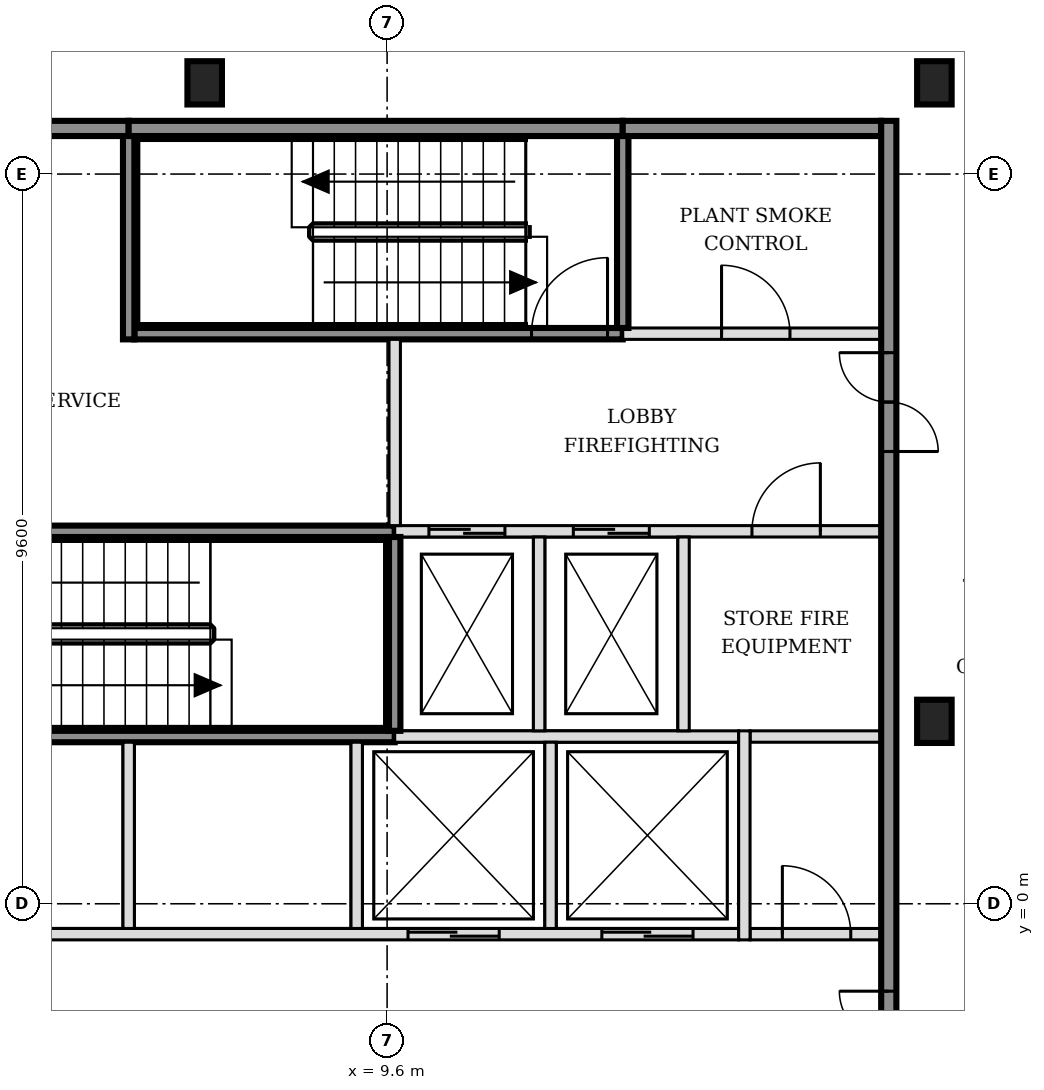
"""IFC4 building model, lengths in metres.
Left out: names, types, materials, properties, quantities, classifications, styles, units other than length and angle.
Written with IfcOpenShell. Run it as: python <this file> out.ifc"""

import sys

from ifc_helpers import new_model, si_unit, direction, frame, frame_2d, origin, origin_2d, place, context, subcontext, project, spatial, rectangle, i_section, extrude, element, fill, save


model = new_model("IFC4")
c1 = context("Model", 3, precision=1e-05, world=origin(), true_north=direction((0.0, 1.0)))
c2 = subcontext(c1, "Body", "Model", "MODEL_VIEW")
j1 = project(units=[si_unit("LENGTHUNIT", "METRE"), si_unit("PLANEANGLEUNIT", "RADIAN")], contexts=[c1])
p1 = place(None, origin())
s1 = spatial("IfcSite", under=j1, at=p1, CompositionType="ELEMENT")
p2 = place(p1, origin())
s2 = spatial("IfcBuilding", under=s1, at=p2, CompositionType="ELEMENT")
p3 = place(p2, frame((0.0, 0.0, 51.0)))
s3 = spatial("IfcBuildingStorey", under=s2, at=p3, CompositionType="ELEMENT", Elevation=51.0)
for number, where, z_axis, x_axis in (
    (1, (16.8, 2.4, -0.15), (0.0, 0.0, 1.0), (1.0, 0.0, 0.0)),
    (2, (7.2, 10.8, -0.15), (0.0, 0.0, 1.0), (1.0, 0.0, 0.0)),
    (3, (16.8, 10.8, -0.15), (0.0, 0.0, 1.0), (1.0, 0.0, 0.0)),
):
    element("IfcColumn", number, at=place(p3, frame(where, z_axis=z_axis, x_axis=x_axis)), inside=s3, PredefinedType="COLUMN", context=c2, shape_type="SweptSolid", body=[
        extrude(i_section(OverallWidth=0.454, OverallDepth=0.569, WebThickness=0.078, FlangeThickness=0.125, FilletRadius=0.015, at=origin_2d()), origin(), (0.0, 0.0, 1.0), 3.6),
    ])
p4 = place(p3, frame((-1.7, -0.4, 0.0), z_axis=(0.0, 0.0, 1.0), x_axis=(1.0, 0.0, 0.0)))
e4 = element("IfcWall", 4, at=p4, inside=s3, PredefinedType="SOLIDWALL", context=c2, shape_type="SweptSolid", body=[
    extrude(rectangle(XDim=15.925, YDim=0.15, at=frame_2d((7.962, 0.0))), origin(), (0.0, 0.0, 1.0), 3.45),
])
p5 = place(p4, frame((0.6, 0.0, 0.0)))
e5 = element("IfcOpeningElement", 5, at=p5, cuts=e4, PredefinedType="OPENING", context=c2, shape_type="SweptSolid", body=[
    extrude(rectangle(XDim=1.1, YDim=2.1, at=frame_2d((0.55, 1.05))), frame((0.0, 0.085, 0.0), z_axis=(0.0, -1.0, 0.0), x_axis=(1.0, 0.0, 0.0)), (0.0, 0.0, 1.0), 0.17),
])
p6 = place(p4, frame((3.1, 0.0, 0.0)))
e6 = element("IfcOpeningElement", 6, at=p6, cuts=e4, PredefinedType="OPENING", context=c2, shape_type="SweptSolid", body=[
    extrude(rectangle(XDim=1.1, YDim=2.1, at=frame_2d((0.55, 1.05))), frame((0.0, 0.085, 0.0), z_axis=(0.0, -1.0, 0.0), x_axis=(1.0, 0.0, 0.0)), (0.0, 0.0, 1.0), 0.17),
])
p7 = place(p4, frame((11.575, 0.0, 0.0)))
e7 = element("IfcOpeningElement", 7, at=p7, cuts=e4, PredefinedType="OPENING", context=c2, shape_type="SweptSolid", body=[
    extrude(rectangle(XDim=1.2, YDim=2.1, at=frame_2d((0.6, 1.05))), frame((0.0, 0.085, 0.0), z_axis=(0.0, -1.0, 0.0), x_axis=(1.0, 0.0, 0.0)), (0.0, 0.0, 1.0), 0.17),
])
p8 = place(p4, frame((14.125, 0.0, 0.0)))
e8 = element("IfcOpeningElement", 8, at=p8, cuts=e4, PredefinedType="OPENING", context=c2, shape_type="SweptSolid", body=[
    extrude(rectangle(XDim=1.2, YDim=2.1, at=frame_2d((0.6, 1.05))), frame((0.0, 0.085, 0.0), z_axis=(0.0, -1.0, 0.0), x_axis=(1.0, 0.0, 0.0)), (0.0, 0.0, 1.0), 0.17),
])
p9 = place(p3, frame((14.375, -0.4, 0.0), z_axis=(0.0, 0.0, 1.0), x_axis=(1.0, 0.0, 0.0)))
e9 = element("IfcWall", 9, at=p9, inside=s3, PredefinedType="PARTITIONING", context=c2, shape_type="SweptSolid", body=[
    extrude(rectangle(XDim=1.725, YDim=0.15, at=frame_2d((0.863, 0.0))), origin(), (0.0, 0.0, 1.0), 3.45),
])
p10 = place(p9, frame((0.425, 0.0, 0.0)))
e10 = element("IfcOpeningElement", 10, at=p10, cuts=e9, PredefinedType="OPENING", context=c2, shape_type="SweptSolid", body=[
    extrude(rectangle(XDim=0.9, YDim=2.1, at=frame_2d((0.45, 1.05))), frame((0.0, 0.085, 0.0), z_axis=(0.0, -1.0, 0.0), x_axis=(1.0, 0.0, 0.0)), (0.0, 0.0, 1.0), 0.17),
])
p11 = place(p3, frame((3.2, 2.2, 0.0), z_axis=(0.0, 0.0, 1.0), x_axis=(1.0, 0.0, 0.0)))
e11 = element("IfcWall", 11, at=p11, inside=s3, PredefinedType="SOLIDWALL", context=c2, shape_type="SweptSolid", body=[
    extrude(rectangle(XDim=6.5, YDim=0.15, at=frame_2d((3.25, 0.0))), origin(), (0.0, 0.0, 1.0), 3.45),
])
p12 = place(p3, frame((9.7, 2.2, 0.0), z_axis=(0.0, 0.0, 1.0), x_axis=(1.0, 0.0, 0.0)))
e12 = element("IfcWall", 12, at=p12, inside=s3, PredefinedType="SOLIDWALL", context=c2, shape_type="SweptSolid", body=[
    extrude(rectangle(XDim=4.525, YDim=0.15, at=frame_2d((2.263, 0.0))), origin(), (0.0, 0.0, 1.0), 3.45),
])
p13 = place(p3, frame((14.375, 2.2, 0.0), z_axis=(0.0, 0.0, 1.0), x_axis=(1.0, 0.0, 0.0)))
e13 = element("IfcWall", 13, at=p13, inside=s3, PredefinedType="PARTITIONING", context=c2, shape_type="SweptSolid", body=[
    extrude(rectangle(XDim=1.725, YDim=0.15, at=frame_2d((0.863, 0.0))), origin(), (0.0, 0.0, 1.0), 3.45),
])
p14 = place(p3, frame((3.275, 4.9, 0.0), z_axis=(0.0, 0.0, 1.0), x_axis=(1.0, 0.0, 0.0)))
e14 = element("IfcWall", 14, at=p14, inside=s3, PredefinedType="SOLIDWALL", context=c2, shape_type="SweptSolid", body=[
    extrude(rectangle(XDim=6.425, YDim=0.15, at=frame_2d((3.212, 0.0))), origin(), (0.0, 0.0, 1.0), 3.45),
])
p15 = place(p14, frame((0.1, 0.0, 0.0)))
e15 = element("IfcOpeningElement", 15, at=p15, cuts=e14, PredefinedType="OPENING", context=c2, shape_type="SweptSolid", body=[
    extrude(rectangle(XDim=1.0, YDim=2.1, at=frame_2d((0.5, 1.05))), frame((0.0, 0.085, 0.0), z_axis=(0.0, -1.0, 0.0), x_axis=(1.0, 0.0, 0.0)), (0.0, 0.0, 1.0), 0.17),
])
p16 = place(p3, frame((9.7, 4.9, 0.0), z_axis=(0.0, 0.0, 1.0), x_axis=(1.0, 0.0, 0.0)))
e16 = element("IfcWall", 16, at=p16, inside=s3, PredefinedType="SOLIDWALL", context=c2, shape_type="SweptSolid", body=[
    extrude(rectangle(XDim=6.4, YDim=0.15, at=frame_2d((3.2, 0.0))), origin(), (0.0, 0.0, 1.0), 3.45),
])
p17 = place(p16, frame((0.45, 0.0, 0.0)))
e17 = element("IfcOpeningElement", 17, at=p17, cuts=e16, PredefinedType="OPENING", context=c2, shape_type="SweptSolid", body=[
    extrude(rectangle(XDim=1.0, YDim=2.1, at=frame_2d((0.5, 1.05))), frame((0.0, 0.085, 0.0), z_axis=(0.0, -1.0, 0.0), x_axis=(1.0, 0.0, 0.0)), (0.0, 0.0, 1.0), 0.17),
])
p18 = place(p16, frame((2.35, 0.0, 0.0)))
e18 = element("IfcOpeningElement", 18, at=p18, cuts=e16, PredefinedType="OPENING", context=c2, shape_type="SweptSolid", body=[
    extrude(rectangle(XDim=1.0, YDim=2.1, at=frame_2d((0.5, 1.05))), frame((0.0, 0.085, 0.0), z_axis=(0.0, -1.0, 0.0), x_axis=(1.0, 0.0, 0.0)), (0.0, 0.0, 1.0), 0.17),
])
p19 = place(p16, frame((4.7, 0.0, 0.0)))
e19 = element("IfcOpeningElement", 19, at=p19, cuts=e16, PredefinedType="OPENING", context=c2, shape_type="SweptSolid", body=[
    extrude(rectangle(XDim=0.9, YDim=2.1, at=frame_2d((0.45, 1.05))), frame((0.0, 0.085, 0.0), z_axis=(0.0, -1.0, 0.0), x_axis=(1.0, 0.0, 0.0)), (0.0, 0.0, 1.0), 0.17),
])
p20 = place(p3, frame((6.275, 7.5, 0.0), z_axis=(0.0, 0.0, 1.0), x_axis=(1.0, 0.0, 0.0)))
e20 = element("IfcWall", 20, at=p20, inside=s3, PredefinedType="SOLIDWALL", context=c2, shape_type="SweptSolid", body=[
    extrude(rectangle(XDim=6.425, YDim=0.15, at=frame_2d((3.212, 0.0))), origin(), (0.0, 0.0, 1.0), 3.45),
])
p21 = place(p20, frame((5.225, 0.0, 0.0)))
e21 = element("IfcOpeningElement", 21, at=p21, cuts=e20, PredefinedType="OPENING", context=c2, shape_type="SweptSolid", body=[
    extrude(rectangle(XDim=1.0, YDim=2.1, at=frame_2d((0.5, 1.05))), frame((0.0, 0.085, 0.0), z_axis=(0.0, -1.0, 0.0), x_axis=(1.0, 0.0, 0.0)), (0.0, 0.0, 1.0), 0.17),
])
p22 = place(p3, frame((12.7, 7.5, 0.0), z_axis=(0.0, 0.0, 1.0), x_axis=(1.0, 0.0, 0.0)))
e22 = element("IfcWall", 22, at=p22, inside=s3, PredefinedType="SOLIDWALL", context=c2, shape_type="SweptSolid", body=[
    extrude(rectangle(XDim=3.4, YDim=0.15, at=frame_2d((1.7, 0.0))), origin(), (0.0, 0.0, 1.0), 3.45),
])
p23 = place(p22, frame((1.3, 0.0, 0.0)))
e23 = element("IfcOpeningElement", 23, at=p23, cuts=e22, PredefinedType="OPENING", context=c2, shape_type="SweptSolid", body=[
    extrude(rectangle(XDim=0.9, YDim=2.1, at=frame_2d((0.45, 1.05))), frame((0.0, 0.085, 0.0), z_axis=(0.0, -1.0, 0.0), x_axis=(1.0, 0.0, 0.0)), (0.0, 0.0, 1.0), 0.17),
])
p24 = place(p3, frame((-1.7, 10.2, 0.0), z_axis=(0.0, 0.0, 1.0), x_axis=(1.0, 0.0, 0.0)))
e24 = element("IfcWall", 24, at=p24, inside=s3, PredefinedType="SOLIDWALL", context=c2, shape_type="SweptSolid", body=[
    extrude(rectangle(XDim=7.9, YDim=0.2, at=frame_2d((3.95, 0.0))), origin(), (0.0, 0.0, 1.0), 3.45),
])
p25 = place(p3, frame((6.2, 10.2, 0.0), z_axis=(0.0, 0.0, 1.0), x_axis=(1.0, 0.0, 0.0)))
e25 = element("IfcWall", 25, at=p25, inside=s3, PredefinedType="SOLIDWALL", context=c2, shape_type="SweptSolid", body=[
    extrude(rectangle(XDim=6.5, YDim=0.2, at=frame_2d((3.25, 0.0))), origin(), (0.0, 0.0, 1.0), 3.45),
])
p26 = place(p3, frame((12.7, 10.2, 0.0), z_axis=(0.0, 0.0, 1.0), x_axis=(1.0, 0.0, 0.0)))
e26 = element("IfcWall", 26, at=p26, inside=s3, PredefinedType="SOLIDWALL", context=c2, shape_type="SweptSolid", body=[
    extrude(rectangle(XDim=3.4, YDim=0.2, at=frame_2d((1.7, 0.0))), origin(), (0.0, 0.0, 1.0), 3.45),
])
p27 = place(p3, frame((6.2, -0.325, 0.0), z_axis=(0.0, 0.0, 1.0), x_axis=(0.0, 1.0, 0.0)))
e27 = element("IfcWall", 27, at=p27, inside=s3, PredefinedType="SOLIDWALL", context=c2, shape_type="SweptSolid", body=[
    extrude(rectangle(XDim=2.45, YDim=0.15, at=frame_2d((1.225, 0.0))), origin(), (0.0, 0.0, 1.0), 3.45),
])
p28 = place(p3, frame((6.2, 7.425, 0.0), z_axis=(0.0, 0.0, 1.0), x_axis=(0.0, 1.0, 0.0)))
e28 = element("IfcWall", 28, at=p28, inside=s3, PredefinedType="SOLIDWALL", context=c2, shape_type="SweptSolid", body=[
    extrude(rectangle(XDim=2.675, YDim=0.15, at=frame_2d((1.337, 0.0))), origin(), (0.0, 0.0, 1.0), 3.45),
])
p29 = place(p3, frame((9.2, -0.325, 0.0), z_axis=(0.0, 0.0, 1.0), x_axis=(0.0, 1.0, 0.0)))
e29 = element("IfcWall", 29, at=p29, inside=s3, PredefinedType="SOLIDWALL", context=c2, shape_type="SweptSolid", body=[
    extrude(rectangle(XDim=2.45, YDim=0.15, at=frame_2d((1.225, 0.0))), origin(), (0.0, 0.0, 1.0), 3.45),
])
p30 = place(p3, frame((9.7, 2.275, 0.0), z_axis=(0.0, 0.0, 1.0), x_axis=(0.0, 1.0, 0.0)))
e30 = element("IfcWall", 30, at=p30, inside=s3, PredefinedType="SOLIDWALL", context=c2, shape_type="SweptSolid", body=[
    extrude(rectangle(XDim=2.55, YDim=0.15, at=frame_2d((1.275, 0.0))), origin(), (0.0, 0.0, 1.0), 3.45),
])
p31 = place(p3, frame((9.7, 4.975, 0.0), z_axis=(0.0, 0.0, 1.0), x_axis=(0.0, 1.0, 0.0)))
e31 = element("IfcWall", 31, at=p31, inside=s3, PredefinedType="SOLIDWALL", context=c2, shape_type="SweptSolid", body=[
    extrude(rectangle(XDim=2.45, YDim=0.15, at=frame_2d((1.225, 0.0))), origin(), (0.0, 0.0, 1.0), 3.45),
])
p32 = place(p3, frame((11.6, 2.275, 0.0), z_axis=(0.0, 0.0, 1.0), x_axis=(0.0, 1.0, 0.0)))
e32 = element("IfcWall", 32, at=p32, inside=s3, PredefinedType="SOLIDWALL", context=c2, shape_type="SweptSolid", body=[
    extrude(rectangle(XDim=2.55, YDim=0.15, at=frame_2d((1.275, 0.0))), origin(), (0.0, 0.0, 1.0), 3.45),
])
p33 = place(p3, frame((11.75, -0.325, 0.0), z_axis=(0.0, 0.0, 1.0), x_axis=(0.0, 1.0, 0.0)))
e33 = element("IfcWall", 33, at=p33, inside=s3, PredefinedType="SOLIDWALL", context=c2, shape_type="SweptSolid", body=[
    extrude(rectangle(XDim=2.45, YDim=0.15, at=frame_2d((1.225, 0.0))), origin(), (0.0, 0.0, 1.0), 3.45),
])
p34 = place(p3, frame((12.7, 7.575, 0.0), z_axis=(0.0, 0.0, 1.0), x_axis=(0.0, 1.0, 0.0)))
e34 = element("IfcWall", 34, at=p34, inside=s3, PredefinedType="SOLIDWALL", context=c2, shape_type="SweptSolid", body=[
    extrude(rectangle(XDim=2.525, YDim=0.15, at=frame_2d((1.263, 0.0))), origin(), (0.0, 0.0, 1.0), 3.45),
])
p35 = place(p3, frame((13.5, 2.275, 0.0), z_axis=(0.0, 0.0, 1.0), x_axis=(0.0, 1.0, 0.0)))
e35 = element("IfcWall", 35, at=p35, inside=s3, PredefinedType="SOLIDWALL", context=c2, shape_type="SweptSolid", body=[
    extrude(rectangle(XDim=2.55, YDim=0.15, at=frame_2d((1.275, 0.0))), origin(), (0.0, 0.0, 1.0), 3.45),
])
p36 = place(p3, frame((14.3, -0.475, 0.0), z_axis=(0.0, 0.0, 1.0), x_axis=(0.0, 1.0, 0.0)))
e36 = element("IfcWall", 36, at=p36, inside=s3, PredefinedType="SOLIDWALL", context=c2, shape_type="SweptSolid", body=[
    extrude(rectangle(XDim=2.75, YDim=0.15, at=frame_2d((1.375, 0.0))), origin(), (0.0, 0.0, 1.0), 3.45),
])
p37 = place(p3, frame((16.2, -5.5, 0.0), z_axis=(0.0, 0.0, 1.0), x_axis=(0.0, 1.0, 0.0)))
e37 = element("IfcWall", 37, at=p37, inside=s3, PredefinedType="SOLIDWALL", context=c2, shape_type="SweptSolid", body=[
    extrude(rectangle(XDim=15.8, YDim=0.2, at=frame_2d((7.9, 0.0))), origin(), (0.0, 0.0, 1.0), 3.45),
])
p38 = place(p37, frame((3.05, 0.0, 0.0)))
e38 = element("IfcOpeningElement", 38, at=p38, cuts=e37, PredefinedType="OPENING", context=c2, shape_type="SweptSolid", body=[
    extrude(rectangle(XDim=1.3, YDim=2.1, at=frame_2d((0.65, 1.05))), frame((0.0, 0.11, 0.0), z_axis=(0.0, -1.0, 0.0), x_axis=(1.0, 0.0, 0.0)), (0.0, 0.0, 1.0), 0.22),
])
p39 = place(p37, frame((11.45, 0.0, 0.0)))
e39 = element("IfcOpeningElement", 39, at=p39, cuts=e37, PredefinedType="OPENING", context=c2, shape_type="SweptSolid", body=[
    extrude(rectangle(XDim=1.3, YDim=2.1, at=frame_2d((0.65, 1.05))), frame((0.0, 0.11, 0.0), z_axis=(0.0, -1.0, 0.0), x_axis=(1.0, 0.0, 0.0)), (0.0, 0.0, 1.0), 0.22),
])
p40 = place(p7, origin())
e40 = element("IfcDoor", 40, at=p40, inside=s3, OperationType="DOUBLE_DOOR_SLIDING", PredefinedType="DOOR", context=c2, shape_type="SweptSolid", body=[
    extrude(rectangle(XDim=1.2, YDim=2.1, at=frame_2d((0.6, 1.05))), frame((0.0, 0.025, 0.0), z_axis=(0.0, -1.0, 0.0), x_axis=(1.0, 0.0, 0.0)), (0.0, 0.0, 1.0), 0.05),
])
fill(e7, e40)
p41 = place(p8, origin())
e41 = element("IfcDoor", 41, at=p41, inside=s3, OperationType="DOUBLE_DOOR_SLIDING", PredefinedType="DOOR", context=c2, shape_type="SweptSolid", body=[
    extrude(rectangle(XDim=1.2, YDim=2.1, at=frame_2d((0.6, 1.05))), frame((0.0, 0.025, 0.0), z_axis=(0.0, -1.0, 0.0), x_axis=(1.0, 0.0, 0.0)), (0.0, 0.0, 1.0), 0.05),
])
fill(e8, e41)
p42 = place(p17, origin())
e42 = element("IfcDoor", 42, at=p42, inside=s3, OperationType="DOUBLE_DOOR_SLIDING", PredefinedType="DOOR", context=c2, shape_type="SweptSolid", body=[
    extrude(rectangle(XDim=1.0, YDim=2.1, at=frame_2d((0.5, 1.05))), frame((0.0, 0.025, 0.0), z_axis=(0.0, -1.0, 0.0), x_axis=(1.0, 0.0, 0.0)), (0.0, 0.0, 1.0), 0.05),
])
fill(e17, e42)
p43 = place(p18, origin())
e43 = element("IfcDoor", 43, at=p43, inside=s3, OperationType="DOUBLE_DOOR_SLIDING", PredefinedType="DOOR", context=c2, shape_type="SweptSolid", body=[
    extrude(rectangle(XDim=1.0, YDim=2.1, at=frame_2d((0.5, 1.05))), frame((0.0, 0.025, 0.0), z_axis=(0.0, -1.0, 0.0), x_axis=(1.0, 0.0, 0.0)), (0.0, 0.0, 1.0), 0.05),
])
fill(e18, e43)
p44 = place(p21, origin())
e44 = element("IfcDoor", 44, at=p44, inside=s3, OperationType="SINGLE_SWING_RIGHT", PredefinedType="DOOR", context=c2, shape_type="SweptSolid", body=[
    extrude(rectangle(XDim=1.0, YDim=2.1, at=frame_2d((0.5, 1.05))), frame((0.0, 0.025, 0.0), z_axis=(0.0, -1.0, 0.0), x_axis=(1.0, 0.0, 0.0)), (0.0, 0.0, 1.0), 0.05),
])
fill(e21, e44)
p45 = place(p38, origin())
e45 = element("IfcDoor", 45, at=p45, inside=s3, OperationType="DOUBLE_DOOR_SINGLE_SWING", PredefinedType="DOOR", context=c2, shape_type="SweptSolid", body=[
    extrude(rectangle(XDim=1.3, YDim=2.1, at=frame_2d((0.65, 1.05))), frame((0.0, 0.025, 0.0), z_axis=(0.0, -1.0, 0.0), x_axis=(1.0, 0.0, 0.0)), (0.0, 0.0, 1.0), 0.05),
])
fill(e38, e45)
p46 = place(p39, origin())
e46 = element("IfcDoor", 46, at=p46, inside=s3, OperationType="DOUBLE_DOOR_SINGLE_SWING", PredefinedType="DOOR", context=c2, shape_type="SweptSolid", body=[
    extrude(rectangle(XDim=1.3, YDim=2.1, at=frame_2d((0.65, 1.05))), frame((0.0, 0.025, 0.0), z_axis=(0.0, -1.0, 0.0), x_axis=(1.0, 0.0, 0.0)), (0.0, 0.0, 1.0), 0.05),
])
fill(e39, e46)
p47 = place(p10, origin())
e47 = element("IfcDoor", 47, at=p47, inside=s3, OperationType="SINGLE_SWING_LEFT", PredefinedType="DOOR", context=c2, shape_type="SweptSolid", body=[
    extrude(rectangle(XDim=0.9, YDim=2.1, at=frame_2d((0.45, 1.05))), frame((0.0, 0.025, 0.0), z_axis=(0.0, -1.0, 0.0), x_axis=(1.0, 0.0, 0.0)), (0.0, 0.0, 1.0), 0.05),
])
fill(e10, e47)
p48 = place(p19, origin())
e48 = element("IfcDoor", 48, at=p48, inside=s3, OperationType="SINGLE_SWING_RIGHT", PredefinedType="DOOR", context=c2, shape_type="SweptSolid", body=[
    extrude(rectangle(XDim=0.9, YDim=2.1, at=frame_2d((0.45, 1.05))), frame((0.0, 0.025, 0.0), z_axis=(0.0, -1.0, 0.0), x_axis=(1.0, 0.0, 0.0)), (0.0, 0.0, 1.0), 0.05),
])
fill(e19, e48)
p49 = place(p23, origin())
e49 = element("IfcDoor", 49, at=p49, inside=s3, OperationType="SINGLE_SWING_LEFT", PredefinedType="DOOR", context=c2, shape_type="SweptSolid", body=[
    extrude(rectangle(XDim=0.9, YDim=2.1, at=frame_2d((0.45, 1.05))), frame((0.0, 0.025, 0.0), z_axis=(0.0, -1.0, 0.0), x_axis=(1.0, 0.0, 0.0)), (0.0, 0.0, 1.0), 0.05),
])
fill(e23, e49)
save(model, sys.argv[1])
